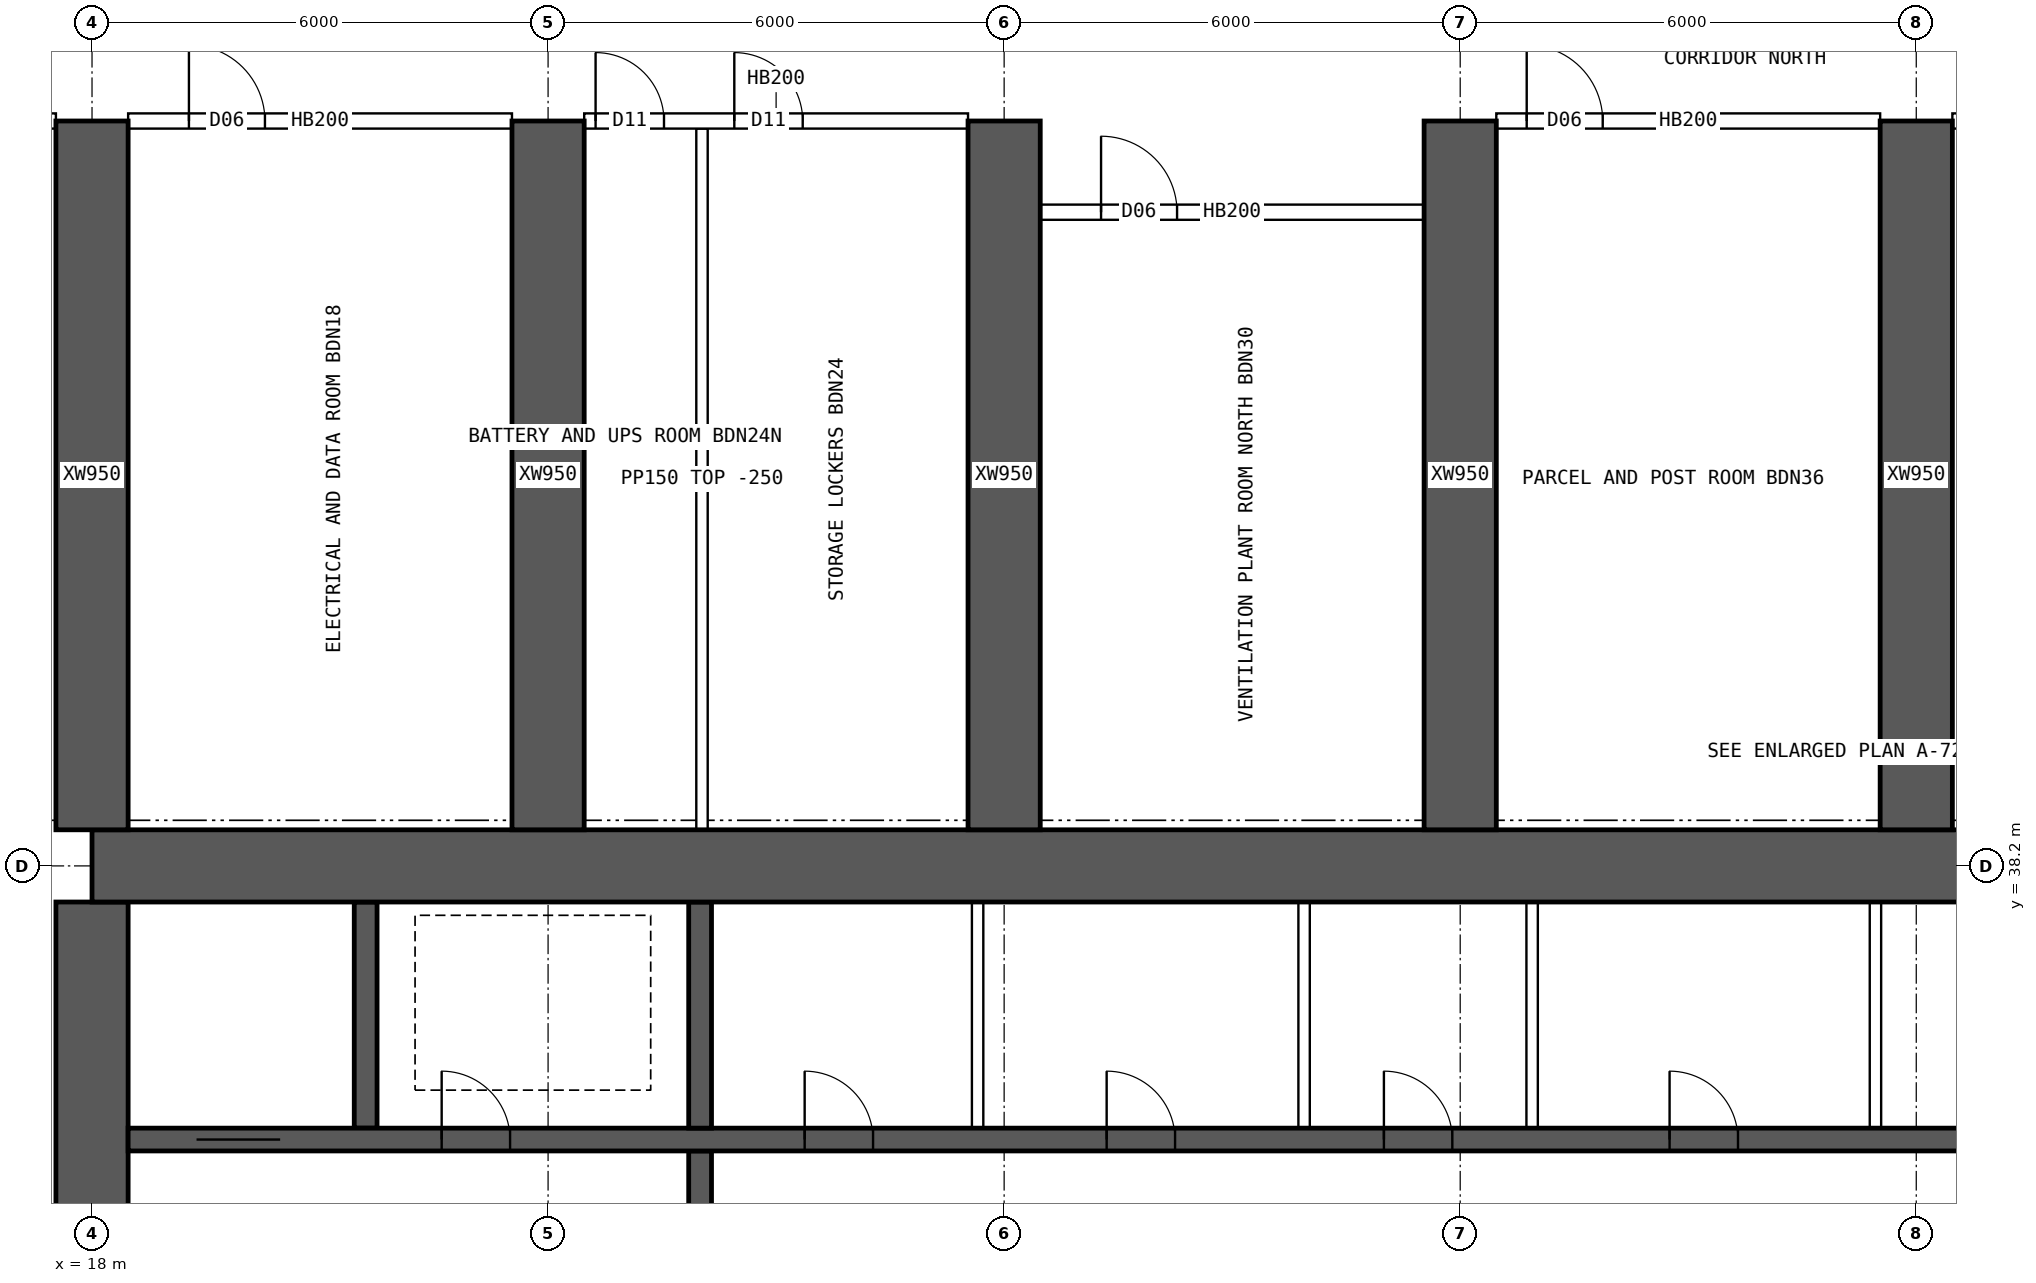
"""IFC4 building model, lengths in metres.
Left out: names, types, materials, properties, quantities, classifications, styles, units other than length and angle.
Written with IfcOpenShell. Run it as: python <this file> out.ifc"""

import sys

from ifc_helpers import new_model, si_unit, direction, frame, frame_2d, origin, place, context, subcontext, project, spatial, rectangle, extrude, element, fill, save


model = new_model("IFC4")
c1 = context("Model", 3, precision=1e-05, world=origin(), true_north=direction((0.0, 1.0)))
c2 = subcontext(c1, "Body", "Model", "MODEL_VIEW")
j1 = project(units=[si_unit("LENGTHUNIT", "METRE"), si_unit("PLANEANGLEUNIT", "RADIAN")], contexts=[c1])
p1 = place(None, origin())
s1 = spatial("IfcSite", under=j1, at=p1, CompositionType="ELEMENT")
p2 = place(p1, origin())
s2 = spatial("IfcBuilding", under=s1, at=p2, CompositionType="ELEMENT")
p3 = place(p2, frame((0.0, 0.0, 106.9)))
s3 = spatial("IfcBuildingStorey", under=s2, at=p3, CompositionType="ELEMENT", Elevation=106.9)
p4 = place(p3, frame((18.0, 38.2, 0.0), z_axis=(0.0, 0.0, 1.0), x_axis=(1.0, 0.0, 0.0)))
e1 = element("IfcWall", 1, at=p4, inside=s3, PredefinedType="SHEAR", context=c2, shape_type="SweptSolid", body=[
    extrude(rectangle(XDim=48.0, YDim=0.95, at=frame_2d((24.0, 0.0))), origin(), (0.0, 0.0, 1.0), 3.75),
])
p5 = place(p3, frame((18.0, 26.275, 0.0), z_axis=(0.0, 0.0, 1.0), x_axis=(0.0, 1.0, 0.0)))
e2 = element("IfcWall", 2, at=p5, inside=s3, PredefinedType="SHEAR", context=c2, shape_type="SweptSolid", body=[
    extrude(rectangle(XDim=11.45, YDim=0.95, at=frame_2d((5.725, 0.0))), origin(), (0.0, 0.0, 1.0), 3.75),
])
p6 = place(p5, frame((5.025, 0.0, 0.0)))
e3 = element("IfcOpeningElement", 3, at=p6, cuts=e2, PredefinedType="OPENING", context=c2, shape_type="SweptSolid", body=[
    extrude(rectangle(XDim=1.2, YDim=2.1, at=frame_2d((0.6, 1.05))), frame((0.0, 0.485, 0.0), z_axis=(0.0, -1.0, 0.0), x_axis=(1.0, 0.0, 0.0)), (0.0, 0.0, 1.0), 0.97),
])
p7 = place(p3, frame((18.475, 34.6, 0.0), z_axis=(0.0, 0.0, 1.0), x_axis=(1.0, 0.0, 0.0)))
e4 = element("IfcWall", 4, at=p7, inside=s3, PredefinedType="SHEAR", context=c2, shape_type="SweptSolid", body=[
    extrude(rectangle(XDim=47.05, YDim=0.3, at=frame_2d((23.525, 0.0))), origin(), (0.0, 0.0, 1.0), 3.75),
])
p8 = place(p7, frame((0.9, 0.0, 0.0)))
e5 = element("IfcOpeningElement", 5, at=p8, cuts=e4, PredefinedType="OPENING", context=c2, shape_type="SweptSolid", body=[
    extrude(rectangle(XDim=1.1, YDim=2.1, at=frame_2d((0.55, 1.05))), frame((0.0, 0.16, 0.0), z_axis=(0.0, -1.0, 0.0), x_axis=(1.0, 0.0, 0.0)), (0.0, 0.0, 1.0), 0.32),
])
p9 = place(p7, frame((45.05, 0.0, 0.0)))
e6 = element("IfcOpeningElement", 6, at=p9, cuts=e4, PredefinedType="OPENING", context=c2, shape_type="SweptSolid", body=[
    extrude(rectangle(XDim=1.1, YDim=2.1, at=frame_2d((0.55, 1.05))), frame((0.0, 0.16, 0.0), z_axis=(0.0, -1.0, 0.0), x_axis=(1.0, 0.0, 0.0)), (0.0, 0.0, 1.0), 0.32),
])
p10 = place(p7, frame((4.125, 0.0, 0.0)))
e7 = element("IfcOpeningElement", 7, at=p10, cuts=e4, PredefinedType="OPENING", context=c2, shape_type="SweptSolid", body=[
    extrude(rectangle(XDim=0.9, YDim=2.1, at=frame_2d((0.45, 1.05))), frame((0.0, 0.16, 0.0), z_axis=(0.0, -1.0, 0.0), x_axis=(1.0, 0.0, 0.0)), (0.0, 0.0, 1.0), 0.32),
])
p11 = place(p7, frame((42.025, 0.0, 0.0)))
e8 = element("IfcOpeningElement", 8, at=p11, cuts=e4, PredefinedType="OPENING", context=c2, shape_type="SweptSolid", body=[
    extrude(rectangle(XDim=0.9, YDim=2.1, at=frame_2d((0.45, 1.05))), frame((0.0, 0.16, 0.0), z_axis=(0.0, -1.0, 0.0), x_axis=(1.0, 0.0, 0.0)), (0.0, 0.0, 1.0), 0.32),
])
p12 = place(p7, frame((8.9, 0.0, 0.0)))
e9 = element("IfcOpeningElement", 9, at=p12, cuts=e4, PredefinedType="OPENING", context=c2, shape_type="SweptSolid", body=[
    extrude(rectangle(XDim=0.9, YDim=2.1, at=frame_2d((0.45, 1.05))), frame((0.0, 0.16, 0.0), z_axis=(0.0, -1.0, 0.0), x_axis=(1.0, 0.0, 0.0)), (0.0, 0.0, 1.0), 0.32),
])
p13 = place(p7, frame((12.874, 0.0, 0.0)))
e10 = element("IfcOpeningElement", 10, at=p13, cuts=e4, PredefinedType="OPENING", context=c2, shape_type="SweptSolid", body=[
    extrude(rectangle(XDim=0.9, YDim=2.1, at=frame_2d((0.45, 1.05))), frame((0.0, 0.16, 0.0), z_axis=(0.0, -1.0, 0.0), x_axis=(1.0, 0.0, 0.0)), (0.0, 0.0, 1.0), 0.32),
])
p14 = place(p7, frame((16.521, 0.0, 0.0)))
e11 = element("IfcOpeningElement", 11, at=p14, cuts=e4, PredefinedType="OPENING", context=c2, shape_type="SweptSolid", body=[
    extrude(rectangle(XDim=0.9, YDim=2.1, at=frame_2d((0.45, 1.05))), frame((0.0, 0.16, 0.0), z_axis=(0.0, -1.0, 0.0), x_axis=(1.0, 0.0, 0.0)), (0.0, 0.0, 1.0), 0.32),
])
p15 = place(p7, frame((20.28, 0.0, 0.0)))
e12 = element("IfcOpeningElement", 12, at=p15, cuts=e4, PredefinedType="OPENING", context=c2, shape_type="SweptSolid", body=[
    extrude(rectangle(XDim=0.9, YDim=2.1, at=frame_2d((0.45, 1.05))), frame((0.0, 0.16, 0.0), z_axis=(0.0, -1.0, 0.0), x_axis=(1.0, 0.0, 0.0)), (0.0, 0.0, 1.0), 0.32),
])
p16 = place(p7, frame((24.686, 0.0, 0.0)))
e13 = element("IfcOpeningElement", 13, at=p16, cuts=e4, PredefinedType="OPENING", context=c2, shape_type="SweptSolid", body=[
    extrude(rectangle(XDim=0.9, YDim=2.1, at=frame_2d((0.45, 1.05))), frame((0.0, 0.16, 0.0), z_axis=(0.0, -1.0, 0.0), x_axis=(1.0, 0.0, 0.0)), (0.0, 0.0, 1.0), 0.32),
])
p17 = place(p7, frame((27.483, 0.0, 0.0)))
e14 = element("IfcOpeningElement", 14, at=p17, cuts=e4, PredefinedType="OPENING", context=c2, shape_type="SweptSolid", body=[
    extrude(rectangle(XDim=0.9, YDim=2.1, at=frame_2d((0.45, 1.05))), frame((0.0, 0.16, 0.0), z_axis=(0.0, -1.0, 0.0), x_axis=(1.0, 0.0, 0.0)), (0.0, 0.0, 1.0), 0.32),
])
p18 = place(p7, frame((29.856, 0.0, 0.0)))
e15 = element("IfcOpeningElement", 15, at=p18, cuts=e4, PredefinedType="OPENING", context=c2, shape_type="SweptSolid", body=[
    extrude(rectangle(XDim=0.9, YDim=2.1, at=frame_2d((0.45, 1.05))), frame((0.0, 0.16, 0.0), z_axis=(0.0, -1.0, 0.0), x_axis=(1.0, 0.0, 0.0)), (0.0, 0.0, 1.0), 0.32),
])
p19 = place(p7, frame((35.326, 0.0, 0.0)))
e16 = element("IfcOpeningElement", 16, at=p19, cuts=e4, PredefinedType="OPENING", context=c2, shape_type="SweptSolid", body=[
    extrude(rectangle(XDim=0.9, YDim=2.1, at=frame_2d((0.45, 1.05))), frame((0.0, 0.16, 0.0), z_axis=(0.0, -1.0, 0.0), x_axis=(1.0, 0.0, 0.0)), (0.0, 0.0, 1.0), 0.32),
])
p20 = place(p3, frame((26.0, 30.55, 0.0), z_axis=(0.0, 0.0, 1.0), x_axis=(0.0, 1.0, 0.0)))
e17 = element("IfcWall", 17, at=p20, inside=s3, PredefinedType="SHEAR", context=c2, shape_type="SweptSolid", body=[
    extrude(rectangle(XDim=3.9, YDim=0.3, at=frame_2d((1.95, 0.0))), origin(), (0.0, 0.0, 1.0), 3.75),
])
p21 = place(p20, frame((1.4, 0.0, 0.0)))
e18 = element("IfcOpeningElement", 18, at=p21, cuts=e17, PredefinedType="OPENING", context=c2, shape_type="SweptSolid", body=[
    extrude(rectangle(XDim=1.2, YDim=2.1, at=frame_2d((0.6, 1.05))), frame((0.0, 0.16, 0.0), z_axis=(0.0, -1.0, 0.0), x_axis=(1.0, 0.0, 0.0)), (0.0, 0.0, 1.0), 0.32),
])
for number, where, z_axis, x_axis in (
    (19, (21.6, 34.75, 0.0), (0.0, 0.0, 1.0), (0.0, 1.0, 0.0)),
    (20, (26.0, 34.75, 0.0), (0.0, 0.0, 1.0), (0.0, 1.0, 0.0)),
):
    element("IfcWall", number, at=place(p3, frame(where, z_axis=z_axis, x_axis=x_axis)), inside=s3, PredefinedType="SHEAR", context=c2, shape_type="SweptSolid", body=[
        extrude(rectangle(XDim=2.975, YDim=0.3, at=frame_2d((1.488, 0.0))), origin(), (0.0, 0.0, 1.0), 3.75),
    ])
for number, where, z_axis, x_axis in (
    (21, (18.0, 38.675, 0.0), (0.0, 0.0, 1.0), (0.0, 1.0, 0.0)),
    (22, (24.0, 38.675, 0.0), (0.0, 0.0, 1.0), (0.0, 1.0, 0.0)),
    (23, (30.0, 38.675, 0.0), (0.0, 0.0, 1.0), (0.0, 1.0, 0.0)),
    (24, (36.0, 38.675, 0.0), (0.0, 0.0, 1.0), (0.0, 1.0, 0.0)),
    (25, (42.0, 38.675, 0.0), (0.0, 0.0, 1.0), (0.0, 1.0, 0.0)),
):
    element("IfcWall", number, at=place(p3, frame(where, z_axis=z_axis, x_axis=x_axis)), inside=s3, PredefinedType="SHEAR", context=c2, shape_type="SweptSolid", body=[
        extrude(rectangle(XDim=9.325, YDim=0.95, at=frame_2d((4.663, 0.0))), origin(), (0.0, 0.0, 1.0), 3.75),
    ])
for number, where, z_axis, x_axis in (
    (26, (29.651, 34.75, 0.0), (0.0, 0.0, 1.0), (0.0, 1.0, 0.0)),
    (27, (33.946, 34.75, 0.0), (0.0, 0.0, 1.0), (0.0, 1.0, 0.0)),
    (28, (36.946, 34.75, 0.0), (0.0, 0.0, 1.0), (0.0, 1.0, 0.0)),
    (29, (41.463, 34.75, 0.0), (0.0, 0.0, 1.0), (0.0, 1.0, 0.0)),
):
    element("IfcWall", number, at=place(p3, frame(where, z_axis=z_axis, x_axis=x_axis)), inside=s3, PredefinedType="SOLIDWALL", context=c2, shape_type="SweptSolid", body=[
        extrude(rectangle(XDim=2.975, YDim=0.15, at=frame_2d((1.488, 0.0))), origin(), (0.0, 0.0, 1.0), 3.5),
    ])
p22 = place(p3, frame((12.475, 48.0, 0.0), z_axis=(0.0, 0.0, 1.0), x_axis=(1.0, 0.0, 0.0)))
e30 = element("IfcWall", 30, at=p22, inside=s3, PredefinedType="SOLIDWALL", context=c2, shape_type="SweptSolid", body=[
    extrude(rectangle(XDim=5.05, YDim=0.2, at=frame_2d((2.525, 0.0))), origin(), (0.0, 0.0, 1.0), 3.5),
])
p23 = place(p22, frame((3.325, 0.0, 0.0)))
e31 = element("IfcOpeningElement", 31, at=p23, cuts=e30, PredefinedType="OPENING", context=c2, shape_type="SweptSolid", body=[
    extrude(rectangle(XDim=1.6, YDim=2.1, at=frame_2d((0.8, 1.05))), frame((0.0, 0.11, 0.0), z_axis=(0.0, -1.0, 0.0), x_axis=(1.0, 0.0, 0.0)), (0.0, 0.0, 1.0), 0.22),
])
p24 = place(p3, frame((18.475, 48.0, 0.0), z_axis=(0.0, 0.0, 1.0), x_axis=(1.0, 0.0, 0.0)))
e32 = element("IfcWall", 32, at=p24, inside=s3, PredefinedType="SOLIDWALL", context=c2, shape_type="SweptSolid", body=[
    extrude(rectangle(XDim=5.05, YDim=0.2, at=frame_2d((2.525, 0.0))), origin(), (0.0, 0.0, 1.0), 3.5),
])
p25 = place(p24, frame((0.8, 0.0, 0.0)))
e33 = element("IfcOpeningElement", 33, at=p25, cuts=e32, PredefinedType="OPENING", context=c2, shape_type="SweptSolid", body=[
    extrude(rectangle(XDim=1.0, YDim=2.1, at=frame_2d((0.5, 1.05))), frame((0.0, 0.11, 0.0), z_axis=(0.0, -1.0, 0.0), x_axis=(1.0, 0.0, 0.0)), (0.0, 0.0, 1.0), 0.22),
])
p26 = place(p3, frame((24.475, 48.0, 0.0), z_axis=(0.0, 0.0, 1.0), x_axis=(1.0, 0.0, 0.0)))
e34 = element("IfcWall", 34, at=p26, inside=s3, PredefinedType="SOLIDWALL", context=c2, shape_type="SweptSolid", body=[
    extrude(rectangle(XDim=5.05, YDim=0.2, at=frame_2d((2.525, 0.0))), origin(), (0.0, 0.0, 1.0), 3.5),
])
p27 = place(p26, frame((0.15, 0.0, 0.0)))
e35 = element("IfcOpeningElement", 35, at=p27, cuts=e34, PredefinedType="OPENING", context=c2, shape_type="SweptSolid", body=[
    extrude(rectangle(XDim=0.9, YDim=2.1, at=frame_2d((0.45, 1.05))), frame((0.0, 0.11, 0.0), z_axis=(0.0, -1.0, 0.0), x_axis=(1.0, 0.0, 0.0)), (0.0, 0.0, 1.0), 0.22),
])
p28 = place(p26, frame((1.975, 0.0, 0.0)))
e36 = element("IfcOpeningElement", 36, at=p28, cuts=e34, PredefinedType="OPENING", context=c2, shape_type="SweptSolid", body=[
    extrude(rectangle(XDim=0.9, YDim=2.1, at=frame_2d((0.45, 1.05))), frame((0.0, 0.11, 0.0), z_axis=(0.0, -1.0, 0.0), x_axis=(1.0, 0.0, 0.0)), (0.0, 0.0, 1.0), 0.22),
])
p29 = place(p3, frame((36.475, 48.0, 0.0), z_axis=(0.0, 0.0, 1.0), x_axis=(1.0, 0.0, 0.0)))
e37 = element("IfcWall", 37, at=p29, inside=s3, PredefinedType="SOLIDWALL", context=c2, shape_type="SweptSolid", body=[
    extrude(rectangle(XDim=5.05, YDim=0.2, at=frame_2d((2.525, 0.0))), origin(), (0.0, 0.0, 1.0), 3.5),
])
p30 = place(p29, frame((0.4, 0.0, 0.0)))
e38 = element("IfcOpeningElement", 38, at=p30, cuts=e37, PredefinedType="OPENING", context=c2, shape_type="SweptSolid", body=[
    extrude(rectangle(XDim=1.0, YDim=2.1, at=frame_2d((0.5, 1.05))), frame((0.0, 0.11, 0.0), z_axis=(0.0, -1.0, 0.0), x_axis=(1.0, 0.0, 0.0)), (0.0, 0.0, 1.0), 0.22),
])
p31 = place(p3, frame((42.475, 48.0, 0.0), z_axis=(0.0, 0.0, 1.0), x_axis=(1.0, 0.0, 0.0)))
e39 = element("IfcWall", 39, at=p31, inside=s3, PredefinedType="SOLIDWALL", context=c2, shape_type="SweptSolid", body=[
    extrude(rectangle(XDim=5.05, YDim=0.2, at=frame_2d((2.525, 0.0))), origin(), (0.0, 0.0, 1.0), 3.5),
])
p32 = place(p31, frame((0.35, 0.0, 0.0)))
e40 = element("IfcOpeningElement", 40, at=p32, cuts=e39, PredefinedType="OPENING", context=c2, shape_type="SweptSolid", body=[
    extrude(rectangle(XDim=0.9, YDim=2.1, at=frame_2d((0.45, 1.05))), frame((0.0, 0.11, 0.0), z_axis=(0.0, -1.0, 0.0), x_axis=(1.0, 0.0, 0.0)), (0.0, 0.0, 1.0), 0.22),
])
p33 = place(p31, frame((3.905, 0.0, 0.0)))
e41 = element("IfcOpeningElement", 41, at=p33, cuts=e39, PredefinedType="OPENING", context=c2, shape_type="SweptSolid", body=[
    extrude(rectangle(XDim=0.9, YDim=2.1, at=frame_2d((0.45, 1.05))), frame((0.0, 0.11, 0.0), z_axis=(0.0, -1.0, 0.0), x_axis=(1.0, 0.0, 0.0)), (0.0, 0.0, 1.0), 0.22),
])
p34 = place(p3, frame((26.025, 38.675, 0.0), z_axis=(0.0, 0.0, 1.0), x_axis=(0.0, 1.0, 0.0)))
e42 = element("IfcWall", 42, at=p34, inside=s3, PredefinedType="PARTITIONING", context=c2, shape_type="SweptSolid", body=[
    extrude(rectangle(XDim=9.225, YDim=0.15, at=frame_2d((4.612, 0.0))), origin(), (0.0, 0.0, 1.0), 3.5),
])
p35 = place(p3, frame((30.475, 46.8, 0.0), z_axis=(0.0, 0.0, 1.0), x_axis=(1.0, 0.0, 0.0)))
e43 = element("IfcWall", 43, at=p35, inside=s3, PredefinedType="SOLIDWALL", context=c2, shape_type="SweptSolid", body=[
    extrude(rectangle(XDim=5.05, YDim=0.2, at=frame_2d((2.525, 0.0))), origin(), (0.0, 0.0, 1.0), 3.5),
])
p36 = place(p35, frame((0.8, 0.0, 0.0)))
e44 = element("IfcOpeningElement", 44, at=p36, cuts=e43, PredefinedType="OPENING", context=c2, shape_type="SweptSolid", body=[
    extrude(rectangle(XDim=1.0, YDim=2.1, at=frame_2d((0.5, 1.05))), frame((0.0, 0.11, 0.0), z_axis=(0.0, -1.0, 0.0), x_axis=(1.0, 0.0, 0.0)), (0.0, 0.0, 1.0), 0.22),
])
p37 = place(p8, origin())
e45 = element("IfcDoor", 45, at=p37, inside=s3, OperationType="DOUBLE_DOOR_SLIDING", PredefinedType="DOOR", context=c2, shape_type="SweptSolid", body=[
    extrude(rectangle(XDim=1.1, YDim=2.1, at=frame_2d((0.55, 1.05))), frame((0.0, 0.025, 0.0), z_axis=(0.0, -1.0, 0.0), x_axis=(1.0, 0.0, 0.0)), (0.0, 0.0, 1.0), 0.05),
])
fill(e5, e45)
p38 = place(p10, origin())
e46 = element("IfcDoor", 46, at=p38, inside=s3, OperationType="SINGLE_SWING_LEFT", PredefinedType="DOOR", context=c2, shape_type="SweptSolid", body=[
    extrude(rectangle(XDim=0.9, YDim=2.1, at=frame_2d((0.45, 1.05))), frame((0.0, 0.025, 0.0), z_axis=(0.0, -1.0, 0.0), x_axis=(1.0, 0.0, 0.0)), (0.0, 0.0, 1.0), 0.05),
])
fill(e7, e46)
p39 = place(p12, origin())
e47 = element("IfcDoor", 47, at=p39, inside=s3, OperationType="SINGLE_SWING_LEFT", PredefinedType="DOOR", context=c2, shape_type="SweptSolid", body=[
    extrude(rectangle(XDim=0.9, YDim=2.1, at=frame_2d((0.45, 1.05))), frame((0.0, 0.025, 0.0), z_axis=(0.0, -1.0, 0.0), x_axis=(1.0, 0.0, 0.0)), (0.0, 0.0, 1.0), 0.05),
])
fill(e9, e47)
p40 = place(p13, origin())
e48 = element("IfcDoor", 48, at=p40, inside=s3, OperationType="SINGLE_SWING_LEFT", PredefinedType="DOOR", context=c2, shape_type="SweptSolid", body=[
    extrude(rectangle(XDim=0.9, YDim=2.1, at=frame_2d((0.45, 1.05))), frame((0.0, 0.025, 0.0), z_axis=(0.0, -1.0, 0.0), x_axis=(1.0, 0.0, 0.0)), (0.0, 0.0, 1.0), 0.05),
])
fill(e10, e48)
p41 = place(p14, origin())
e49 = element("IfcDoor", 49, at=p41, inside=s3, OperationType="SINGLE_SWING_LEFT", PredefinedType="DOOR", context=c2, shape_type="SweptSolid", body=[
    extrude(rectangle(XDim=0.9, YDim=2.1, at=frame_2d((0.45, 1.05))), frame((0.0, 0.025, 0.0), z_axis=(0.0, -1.0, 0.0), x_axis=(1.0, 0.0, 0.0)), (0.0, 0.0, 1.0), 0.05),
])
fill(e11, e49)
p42 = place(p15, origin())
e50 = element("IfcDoor", 50, at=p42, inside=s3, OperationType="SINGLE_SWING_LEFT", PredefinedType="DOOR", context=c2, shape_type="SweptSolid", body=[
    extrude(rectangle(XDim=0.9, YDim=2.1, at=frame_2d((0.45, 1.05))), frame((0.0, 0.025, 0.0), z_axis=(0.0, -1.0, 0.0), x_axis=(1.0, 0.0, 0.0)), (0.0, 0.0, 1.0), 0.05),
])
fill(e12, e50)
p43 = place(p25, origin())
e51 = element("IfcDoor", 51, at=p43, inside=s3, OperationType="SINGLE_SWING_LEFT", PredefinedType="DOOR", context=c2, shape_type="SweptSolid", body=[
    extrude(rectangle(XDim=1.0, YDim=2.1, at=frame_2d((0.5, 1.05))), frame((0.0, 0.025, 0.0), z_axis=(0.0, -1.0, 0.0), x_axis=(1.0, 0.0, 0.0)), (0.0, 0.0, 1.0), 0.05),
])
fill(e33, e51)
p44 = place(p27, origin())
e52 = element("IfcDoor", 52, at=p44, inside=s3, OperationType="SINGLE_SWING_LEFT", PredefinedType="DOOR", context=c2, shape_type="SweptSolid", body=[
    extrude(rectangle(XDim=0.9, YDim=2.1, at=frame_2d((0.45, 1.05))), frame((0.0, 0.025, 0.0), z_axis=(0.0, -1.0, 0.0), x_axis=(1.0, 0.0, 0.0)), (0.0, 0.0, 1.0), 0.05),
])
fill(e35, e52)
p45 = place(p28, origin())
e53 = element("IfcDoor", 53, at=p45, inside=s3, OperationType="SINGLE_SWING_LEFT", PredefinedType="DOOR", context=c2, shape_type="SweptSolid", body=[
    extrude(rectangle(XDim=0.9, YDim=2.1, at=frame_2d((0.45, 1.05))), frame((0.0, 0.025, 0.0), z_axis=(0.0, -1.0, 0.0), x_axis=(1.0, 0.0, 0.0)), (0.0, 0.0, 1.0), 0.05),
])
fill(e36, e53)
p46 = place(p36, origin())
e54 = element("IfcDoor", 54, at=p46, inside=s3, OperationType="SINGLE_SWING_LEFT", PredefinedType="DOOR", context=c2, shape_type="SweptSolid", body=[
    extrude(rectangle(XDim=1.0, YDim=2.1, at=frame_2d((0.5, 1.05))), frame((0.0, 0.025, 0.0), z_axis=(0.0, -1.0, 0.0), x_axis=(1.0, 0.0, 0.0)), (0.0, 0.0, 1.0), 0.05),
])
fill(e44, e54)
p47 = place(p30, origin())
e55 = element("IfcDoor", 55, at=p47, inside=s3, OperationType="SINGLE_SWING_LEFT", PredefinedType="DOOR", context=c2, shape_type="SweptSolid", body=[
    extrude(rectangle(XDim=1.0, YDim=2.1, at=frame_2d((0.5, 1.05))), frame((0.0, 0.025, 0.0), z_axis=(0.0, -1.0, 0.0), x_axis=(1.0, 0.0, 0.0)), (0.0, 0.0, 1.0), 0.05),
])
fill(e38, e55)
save(model, sys.argv[1])
